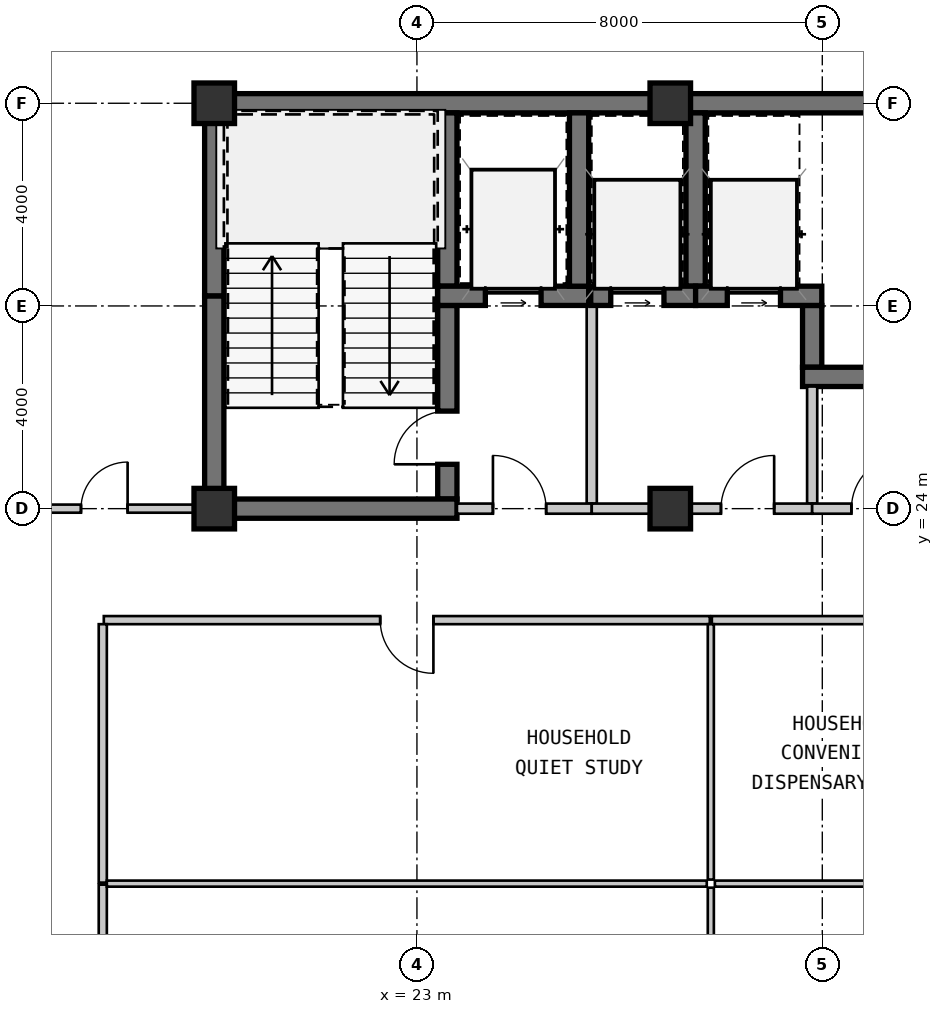
"""IFC4 building model, lengths in metres.
Left out: names, types, materials, properties, quantities, classifications, styles, units other than length and angle.
Written with IfcOpenShell. Run it as: python <this file> out.ifc"""

import sys

from ifc_helpers import new_model, si_unit, direction, frame, frame_2d, origin, origin_2d, place, context, subcontext, project, spatial, rectangle, extrude, source, transform, mapped, element, fill, save


model = new_model("IFC4")
c1 = context("Model", 3, precision=1e-05, world=origin(), true_north=direction((0.0, 1.0)))
c2 = subcontext(c1, "Body", "Model", "MODEL_VIEW")
j1 = project(units=[si_unit("LENGTHUNIT", "METRE"), si_unit("PLANEANGLEUNIT", "RADIAN")], contexts=[c1])
p1 = place(None, origin())
s1 = spatial("IfcSite", under=j1, at=p1, CompositionType="ELEMENT")
p2 = place(p1, origin())
s2 = spatial("IfcBuilding", under=s1, at=p2, CompositionType="ELEMENT")
p3 = place(p2, frame((0.0, 0.0, 45.15)))
s3 = spatial("IfcBuildingStorey", under=s2, at=p3, CompositionType="ELEMENT", Elevation=45.15)
m1 = source(origin(), c2, "Body", "SweptSolid", [
    extrude(rectangle(XDim=0.8, YDim=0.8, at=origin_2d()), origin(), (0.0, 0.0, 1.0), 3.15),
])
for number, where, z_axis, x_axis in (
    (1, (19.0, 24.0, 0.0), (0.0, 0.0, 1.0), (1.0, 0.0, 0.0)),
    (2, (28.0, 24.0, 0.0), (0.0, 0.0, 1.0), (1.0, 0.0, 0.0)),
    (3, (19.0, 32.0, 0.0), (0.0, 0.0, 1.0), (1.0, 0.0, 0.0)),
    (4, (28.0, 32.0, 0.0), (0.0, 0.0, 1.0), (1.0, 0.0, 0.0)),
):
    element("IfcColumn", number, at=place(p3, frame(where, z_axis=z_axis, x_axis=x_axis)), inside=s3, PredefinedType="COLUMN", context=c2, shape_type="MappedRepresentation", body=[
        mapped(m1, transform((0.0, 0.0, 0.0), scale=1.0)),
    ])
m2 = source(origin(), c2, "Body", "SweptSolid", [
    extrude(rectangle(XDim=9.19, YDim=0.38, at=frame_2d((4.595, 0.0))), origin(), (0.0, 0.0, 1.0), 2.93),
])
p4 = place(p3, frame((18.81, 32.0, 0.0), z_axis=(0.0, 0.0, 1.0), x_axis=(1.0, 0.0, 0.0)))
e5 = element("IfcWall", 5, at=p4, inside=s3, PredefinedType="SHEAR", context=c2, shape_type="MappedRepresentation", body=[
    mapped(m2, transform((0.0, 0.0, 0.0), scale=1.0)),
])
m3 = source(origin(), c2, "Body", "SweptSolid", [
    extrude(rectangle(XDim=11.2, YDim=0.38, at=frame_2d((5.6, 0.0))), origin(), (0.0, 0.0, 1.0), 2.93),
])
p5 = place(p3, frame((28.0, 32.0, 0.0), z_axis=(0.0, 0.0, 1.0), x_axis=(1.0, 0.0, 0.0)))
e6 = element("IfcWall", 6, at=p5, inside=s3, PredefinedType="SHEAR", context=c2, shape_type="MappedRepresentation", body=[
    mapped(m3, transform((0.0, 0.0, 0.0), scale=1.0)),
])
m4 = source(origin(), c2, "Body", "SweptSolid", [
    extrude(rectangle(XDim=4.01, YDim=0.38, at=frame_2d((2.005, 0.0))), origin(), (0.0, 0.0, 1.0), 2.93),
])
p6 = place(p3, frame((19.0, 24.19, 0.0), z_axis=(0.0, 0.0, 1.0), x_axis=(0.0, 1.0, 0.0)))
e7 = element("IfcWall", 7, at=p6, inside=s3, PredefinedType="SHEAR", context=c2, shape_type="MappedRepresentation", body=[
    mapped(m4, transform((0.0, 0.0, 0.0), scale=1.0)),
])
m5 = source(origin(), c2, "Body", "SweptSolid", [
    extrude(rectangle(XDim=3.61, YDim=0.38, at=frame_2d((1.805, 0.0))), origin(), (0.0, 0.0, 1.0), 2.93),
])
p7 = place(p3, frame((19.0, 28.2, 0.0), z_axis=(0.0, 0.0, 1.0), x_axis=(0.0, 1.0, 0.0)))
e8 = element("IfcWall", 8, at=p7, inside=s3, PredefinedType="SHEAR", context=c2, shape_type="MappedRepresentation", body=[
    mapped(m5, transform((0.0, 0.0, 0.0), scale=1.0)),
])
m6 = source(origin(), c2, "Body", "SweptSolid", [
    extrude(rectangle(XDim=3.42, YDim=0.38, at=frame_2d((1.71, 0.0))), origin(), (0.0, 0.0, 1.0), 2.93),
])
p8 = place(p3, frame((23.6, 28.39, 0.0), z_axis=(0.0, 0.0, 1.0), x_axis=(0.0, 1.0, 0.0)))
e9 = element("IfcWall", 9, at=p8, inside=s3, PredefinedType="SHEAR", context=c2, shape_type="MappedRepresentation", body=[
    mapped(m6, transform((0.0, 0.0, 0.0), scale=1.0)),
])
m7 = source(origin(), c2, "Body", "SweptSolid", [
    extrude(rectangle(XDim=3.82, YDim=0.38, at=frame_2d((1.91, 0.0))), origin(), (0.0, 0.0, 1.0), 2.93),
])
p9 = place(p3, frame((23.6, 24.19, 0.0), z_axis=(0.0, 0.0, 1.0), x_axis=(0.0, 1.0, 0.0)))
e10 = element("IfcWall", 10, at=p9, inside=s3, PredefinedType="SHEAR", context=c2, shape_type="MappedRepresentation", body=[
    mapped(m7, transform((0.0, 0.0, 0.0), scale=1.0)),
])
m8 = source(origin(), c2, "Body", "SweptSolid", [
    extrude(rectangle(XDim=1.05, YDim=2.1, at=frame_2d((0.525, 1.05))), frame((0.0, 0.2, 0.0), z_axis=(0.0, -1.0, 0.0), x_axis=(1.0, 0.0, 0.0)), (0.0, 0.0, 1.0), 0.4),
])
p10 = place(p9, frame((0.685, 0.0, 0.0)))
e11 = element("IfcOpeningElement", 11, at=p10, cuts=e10, PredefinedType="OPENING", context=c2, shape_type="MappedRepresentation", body=[
    mapped(m8, transform((0.0, 0.0, 0.0), scale=1.0)),
])
m9 = source(origin(), c2, "Body", "SweptSolid", [
    extrude(rectangle(XDim=4.98, YDim=0.38, at=frame_2d((2.49, 0.0))), origin(), (0.0, 0.0, 1.0), 2.93),
])
p11 = place(p3, frame((18.81, 24.0, 0.0), z_axis=(0.0, 0.0, 1.0), x_axis=(1.0, 0.0, 0.0)))
e12 = element("IfcWall", 12, at=p11, inside=s3, PredefinedType="SHEAR", context=c2, shape_type="MappedRepresentation", body=[
    mapped(m9, transform((0.0, 0.0, 0.0), scale=1.0)),
])
m10 = source(origin(), c2, "Body", "SweptSolid", [
    extrude(rectangle(XDim=2.98, YDim=0.38, at=frame_2d((1.49, 0.0))), origin(), (0.0, 0.0, 1.0), 2.93),
])
p12 = place(p3, frame((23.41, 28.2, 0.0), z_axis=(0.0, 0.0, 1.0), x_axis=(1.0, 0.0, 0.0)))
e13 = element("IfcWall", 13, at=p12, inside=s3, PredefinedType="SHEAR", context=c2, shape_type="MappedRepresentation", body=[
    mapped(m10, transform((0.0, 0.0, 0.0), scale=1.0)),
])
m11 = source(origin(), c2, "Body", "SweptSolid", [
    extrude(rectangle(XDim=1.1, YDim=2.15, at=frame_2d((0.55, 1.075))), frame((0.0, 0.2, 0.0), z_axis=(0.0, -1.0, 0.0), x_axis=(1.0, 0.0, 0.0)), (0.0, 0.0, 1.0), 0.4),
])
p13 = place(p12, frame((0.94, 0.0, 0.0)))
e14 = element("IfcOpeningElement", 14, at=p13, cuts=e13, PredefinedType="OPENING", context=c2, shape_type="MappedRepresentation", body=[
    mapped(m11, transform((0.0, 0.0, 0.0), scale=1.0)),
])
p14 = place(p3, frame((26.2, 28.39, 0.0), z_axis=(0.0, 0.0, 1.0), x_axis=(0.0, 1.0, 0.0)))
e15 = element("IfcWall", 15, at=p14, inside=s3, PredefinedType="SHEAR", context=c2, shape_type="MappedRepresentation", body=[
    mapped(m6, transform((0.0, 0.0, 0.0), scale=1.0)),
])
m12 = source(origin(), c2, "Body", "SweptSolid", [
    extrude(rectangle(XDim=3.91, YDim=0.2, at=frame_2d((1.955, 0.0))), origin(), (0.0, 0.0, 1.0), 2.93),
])
p15 = place(p3, frame((26.45, 24.1, 0.0), z_axis=(0.0, 0.0, 1.0), x_axis=(0.0, 1.0, 0.0)))
e16 = element("IfcWall", 16, at=p15, inside=s3, PredefinedType="SOLIDWALL", context=c2, shape_type="MappedRepresentation", body=[
    mapped(m12, transform((0.0, 0.0, 0.0), scale=1.0)),
])
m13 = source(origin(), c2, "Body", "SweptSolid", [
    extrude(rectangle(XDim=2.66, YDim=0.2, at=frame_2d((1.33, 0.0))), origin(), (0.0, 0.0, 1.0), 2.47),
])
p16 = place(p3, frame((23.79, 24.0, 0.0), z_axis=(0.0, 0.0, 1.0), x_axis=(1.0, 0.0, 0.0)))
e17 = element("IfcWall", 17, at=p16, inside=s3, PredefinedType="SOLIDWALL", context=c2, shape_type="MappedRepresentation", body=[
    mapped(m13, transform((0.0, 0.0, 0.0), scale=1.0)),
])
m14 = source(origin(), c2, "Body", "SweptSolid", [
    extrude(rectangle(XDim=1.05, YDim=2.1, at=frame_2d((0.525, 1.05))), frame((0.0, 0.11, 0.0), z_axis=(0.0, -1.0, 0.0), x_axis=(1.0, 0.0, 0.0)), (0.0, 0.0, 1.0), 0.22),
])
p17 = place(p16, frame((0.71, 0.0, 0.0)))
e18 = element("IfcOpeningElement", 18, at=p17, cuts=e17, PredefinedType="OPENING", context=c2, shape_type="MappedRepresentation", body=[
    mapped(m14, transform((0.0, 0.0, 0.0), scale=1.0)),
])
m15 = source(origin(), c2, "Body", "SweptSolid", [
    extrude(rectangle(XDim=1.22, YDim=0.38, at=frame_2d((0.61, 0.0))), origin(), (0.0, 0.0, 1.0), 2.93),
])
p18 = place(p3, frame((30.8, 28.01, 0.0), z_axis=(0.0, 0.0, 1.0), x_axis=(0.0, -1.0, 0.0)))
e19 = element("IfcWall", 19, at=p18, inside=s3, PredefinedType="SHEAR", context=c2, shape_type="MappedRepresentation", body=[
    mapped(m15, transform((0.0, 0.0, 0.0), scale=1.0)),
])
m16 = source(origin(), c2, "Body", "SweptSolid", [
    extrude(rectangle(XDim=2.24, YDim=0.38, at=frame_2d((1.12, 0.0))), origin(), (0.0, 0.0, 1.0), 2.93),
])
p19 = place(p3, frame((30.61, 26.6, 0.0), z_axis=(0.0, 0.0, 1.0), x_axis=(1.0, 0.0, 0.0)))
e20 = element("IfcWall", 20, at=p19, inside=s3, PredefinedType="SHEAR", context=c2, shape_type="MappedRepresentation", body=[
    mapped(m16, transform((0.0, 0.0, 0.0), scale=1.0)),
])
p20 = place(p3, frame((28.5, 28.39, 0.0), z_axis=(0.0, 0.0, 1.0), x_axis=(0.0, 1.0, 0.0)))
e21 = element("IfcWall", 21, at=p20, inside=s3, PredefinedType="SHEAR", context=c2, shape_type="MappedRepresentation", body=[
    mapped(m6, transform((0.0, 0.0, 0.0), scale=1.0)),
])
m17 = source(origin(), c2, "Body", "SweptSolid", [
    extrude(rectangle(XDim=2.07, YDim=0.38, at=frame_2d((1.035, 0.0))), origin(), (0.0, 0.0, 1.0), 2.93),
])
p21 = place(p3, frame((26.43, 28.2, 0.0), z_axis=(0.0, 0.0, 1.0), x_axis=(1.0, 0.0, 0.0)))
e22 = element("IfcWall", 22, at=p21, inside=s3, PredefinedType="SHEAR", context=c2, shape_type="MappedRepresentation", body=[
    mapped(m17, transform((0.0, 0.0, 0.0), scale=1.0)),
])
m18 = source(origin(), c2, "Body", "SweptSolid", [
    extrude(rectangle(XDim=1.05, YDim=2.15, at=frame_2d((0.525, 1.075))), frame((0.0, 0.2, 0.0), z_axis=(0.0, -1.0, 0.0), x_axis=(1.0, 0.0, 0.0)), (0.0, 0.0, 1.0), 0.4),
])
p22 = place(p21, frame((0.395, 0.0, 0.0)))
e23 = element("IfcOpeningElement", 23, at=p22, cuts=e22, PredefinedType="OPENING", context=c2, shape_type="MappedRepresentation", body=[
    mapped(m18, transform((0.0, 0.0, 0.0), scale=1.0)),
])
m19 = source(origin(), c2, "Body", "SweptSolid", [
    extrude(rectangle(XDim=2.49, YDim=0.38, at=frame_2d((1.245, 0.0))), origin(), (0.0, 0.0, 1.0), 2.93),
])
p23 = place(p3, frame((28.5, 28.2, 0.0), z_axis=(0.0, 0.0, 1.0), x_axis=(1.0, 0.0, 0.0)))
e24 = element("IfcWall", 24, at=p23, inside=s3, PredefinedType="SHEAR", context=c2, shape_type="MappedRepresentation", body=[
    mapped(m19, transform((0.0, 0.0, 0.0), scale=1.0)),
])
p24 = place(p23, frame((0.625, 0.0, 0.0)))
e25 = element("IfcOpeningElement", 25, at=p24, cuts=e24, PredefinedType="OPENING", context=c2, shape_type="MappedRepresentation", body=[
    mapped(m18, transform((0.0, 0.0, 0.0), scale=1.0)),
])
m20 = source(origin(), c2, "Body", "SweptSolid", [
    extrude(rectangle(XDim=2.31, YDim=0.2, at=frame_2d((1.155, 0.0))), origin(), (0.0, 0.0, 1.0), 2.93),
])
p25 = place(p3, frame((30.8, 26.41, 0.0), z_axis=(0.0, 0.0, 1.0), x_axis=(0.0, -1.0, 0.0)))
e26 = element("IfcWall", 26, at=p25, inside=s3, PredefinedType="SOLIDWALL", context=c2, shape_type="MappedRepresentation", body=[
    mapped(m20, transform((0.0, 0.0, 0.0), scale=1.0)),
])
m21 = source(origin(), c2, "Body", "SweptSolid", [
    extrude(rectangle(XDim=4.35, YDim=0.2, at=frame_2d((2.175, 0.0))), origin(), (0.0, 0.0, 1.0), 2.47),
])
p26 = place(p3, frame((30.8, 24.0, 0.0), z_axis=(0.0, 0.0, 1.0), x_axis=(-1.0, 0.0, 0.0)))
e27 = element("IfcWall", 27, at=p26, inside=s3, PredefinedType="SOLIDWALL", context=c2, shape_type="MappedRepresentation", body=[
    mapped(m21, transform((0.0, 0.0, 0.0), scale=1.0)),
])
p27 = place(p26, frame((0.75, 0.0, 0.0)))
e28 = element("IfcOpeningElement", 28, at=p27, cuts=e27, PredefinedType="OPENING", context=c2, shape_type="MappedRepresentation", body=[
    mapped(m14, transform((0.0, 0.0, 0.0), scale=1.0)),
])
m22 = source(origin(), c2, "Body", "SweptSolid", [
    extrude(rectangle(XDim=2.6, YDim=0.2, at=frame_2d((1.3, 0.0))), origin(), (0.0, 0.0, 1.0), 2.47),
])
p28 = place(p3, frame((33.4, 24.0, 0.0), z_axis=(0.0, 0.0, 1.0), x_axis=(-1.0, 0.0, 0.0)))
e29 = element("IfcWall", 29, at=p28, inside=s3, PredefinedType="SOLIDWALL", context=c2, shape_type="MappedRepresentation", body=[
    mapped(m22, transform((0.0, 0.0, 0.0), scale=1.0)),
])
p29 = place(p28, frame((0.775, 0.0, 0.0)))
e30 = element("IfcOpeningElement", 30, at=p29, cuts=e29, PredefinedType="OPENING", context=c2, shape_type="MappedRepresentation", body=[
    mapped(m14, transform((0.0, 0.0, 0.0), scale=1.0)),
])
m23 = source(origin(), c2, "Body", "SweptSolid", [
    extrude(rectangle(XDim=5.16, YDim=0.16, at=frame_2d((2.58, 0.0))), origin(), (0.0, 0.0, 1.0), 2.93),
])
p30 = place(p3, frame((16.8, 16.58, 0.0), z_axis=(0.0, 0.0, 1.0), x_axis=(0.0, -1.0, 0.0)))
e31 = element("IfcWall", 31, at=p30, inside=s3, PredefinedType="PARTITIONING", context=c2, shape_type="MappedRepresentation", body=[
    mapped(m23, transform((0.0, 0.0, 0.0), scale=1.0)),
])
m24 = source(origin(), c2, "Body", "SweptSolid", [
    extrude(rectangle(XDim=11.959, YDim=0.16, at=frame_2d((5.98, 0.0))), origin(), (0.0, 0.0, 1.0), 2.93),
])
p31 = place(p3, frame((28.78, 21.8, 0.0), z_axis=(0.0, 0.0, 1.0), x_axis=(-1.0, 0.0, 0.0)))
e32 = element("IfcWall", 32, at=p31, inside=s3, PredefinedType="PARTITIONING", context=c2, shape_type="MappedRepresentation", body=[
    mapped(m24, transform((0.0, 0.0, 0.0), scale=1.0)),
])
m25 = source(origin(), c2, "Body", "SweptSolid", [
    extrude(rectangle(XDim=1.05, YDim=2.1, at=frame_2d((0.525, 1.05))), frame((0.0, 0.09, 0.0), z_axis=(0.0, -1.0, 0.0), x_axis=(1.0, 0.0, 0.0)), (0.0, 0.0, 1.0), 0.18),
])
p32 = place(p31, frame((5.455, 0.0, 0.0)))
e33 = element("IfcOpeningElement", 33, at=p32, cuts=e32, PredefinedType="OPENING", context=c2, shape_type="MappedRepresentation", body=[
    mapped(m25, transform((0.0, 0.0, 0.0), scale=1.0)),
])
m26 = source(origin(), c2, "Body", "SweptSolid", [
    extrude(rectangle(XDim=5.1, YDim=0.16, at=frame_2d((2.55, 0.0))), origin(), (0.0, 0.0, 1.0), 2.93),
])
p33 = place(p3, frame((16.8, 21.72, 0.0), z_axis=(0.0, 0.0, 1.0), x_axis=(0.0, -1.0, 0.0)))
e34 = element("IfcWall", 34, at=p33, inside=s3, PredefinedType="PARTITIONING", context=c2, shape_type="MappedRepresentation", body=[
    mapped(m26, transform((0.0, 0.0, 0.0), scale=1.0)),
])
m27 = source(origin(), c2, "Body", "SweptSolid", [
    extrude(rectangle(XDim=12.159, YDim=0.16, at=frame_2d((6.08, 0.0))), origin(), (0.0, 0.0, 1.0), 2.93),
])
p34 = place(p3, frame((40.98, 21.8, 0.0), z_axis=(0.0, 0.0, 1.0), x_axis=(-1.0, 0.0, 0.0)))
e35 = element("IfcWall", 35, at=p34, inside=s3, PredefinedType="PARTITIONING", context=c2, shape_type="MappedRepresentation", body=[
    mapped(m27, transform((0.0, 0.0, 0.0), scale=1.0)),
])
p35 = place(p34, frame((5.555, 0.0, 0.0)))
e36 = element("IfcOpeningElement", 36, at=p35, cuts=e35, PredefinedType="OPENING", context=c2, shape_type="MappedRepresentation", body=[
    mapped(m25, transform((0.0, 0.0, 0.0), scale=1.0)),
])
m28 = source(origin(), c2, "Body", "SweptSolid", [
    extrude(rectangle(XDim=4.13, YDim=0.16, at=frame_2d((2.065, 0.0))), origin(), (0.0, 0.0, 1.0), 2.93),
])
p36 = place(p3, frame((14.68, 24.0, 0.0), z_axis=(0.0, 0.0, 1.0), x_axis=(1.0, 0.0, 0.0)))
e37 = element("IfcWall", 37, at=p36, inside=s3, PredefinedType="PARTITIONING", context=c2, shape_type="MappedRepresentation", body=[
    mapped(m28, transform((0.0, 0.0, 0.0), scale=1.0)),
])
m29 = source(origin(), c2, "Body", "SweptSolid", [
    extrude(rectangle(XDim=0.92, YDim=2.1, at=frame_2d((0.46, 1.05))), frame((0.0, 0.09, 0.0), z_axis=(0.0, -1.0, 0.0), x_axis=(1.0, 0.0, 0.0)), (0.0, 0.0, 1.0), 0.18),
])
p37 = place(p36, frame((1.69, 0.0, 0.0)))
e38 = element("IfcOpeningElement", 38, at=p37, cuts=e37, PredefinedType="OPENING", context=c2, shape_type="MappedRepresentation", body=[
    mapped(m29, transform((0.0, 0.0, 0.0), scale=1.0)),
])
m30 = source(origin(), c2, "Body", "SweptSolid", [
    extrude(rectangle(XDim=11.84, YDim=0.12, at=frame_2d((5.92, 0.0))), origin(), (0.0, 0.0, 1.0), 2.93),
])
p38 = place(p3, frame((16.88, 16.6, 0.0), z_axis=(0.0, 0.0, 1.0), x_axis=(1.0, 0.0, 0.0)))
e39 = element("IfcWall", 39, at=p38, inside=s3, PredefinedType="PARTITIONING", context=c2, shape_type="MappedRepresentation", body=[
    mapped(m30, transform((0.0, 0.0, 0.0), scale=1.0)),
])
m31 = source(origin(), c2, "Body", "SweptSolid", [
    extrude(rectangle(XDim=5.04, YDim=0.12, at=frame_2d((2.52, 0.0))), origin(), (0.0, 0.0, 1.0), 2.93),
])
for number, where, z_axis, x_axis in (
    (40, (28.8, 16.52, 0.0), (0.0, 0.0, 1.0), (0.0, -1.0, 0.0)),
    (41, (28.8, 21.72, 0.0), (0.0, 0.0, 1.0), (0.0, -1.0, 0.0)),
):
    element("IfcWall", number, at=place(p3, frame(where, z_axis=z_axis, x_axis=x_axis)), inside=s3, PredefinedType="PARTITIONING", context=c2, shape_type="MappedRepresentation", body=[
        mapped(m31, transform((0.0, 0.0, 0.0), scale=1.0)),
    ])
m32 = source(origin(), c2, "Body", "SweptSolid", [
    extrude(rectangle(XDim=12.04, YDim=0.12, at=frame_2d((6.02, 0.0))), origin(), (0.0, 0.0, 1.0), 2.93),
])
p39 = place(p3, frame((28.88, 16.6, 0.0), z_axis=(0.0, 0.0, 1.0), x_axis=(1.0, 0.0, 0.0)))
e42 = element("IfcWall", 42, at=p39, inside=s3, PredefinedType="PARTITIONING", context=c2, shape_type="MappedRepresentation", body=[
    mapped(m32, transform((0.0, 0.0, 0.0), scale=1.0)),
])
m33 = source(origin(), c2, "Body", "SweptSolid", [
    extrude(rectangle(XDim=1.05, YDim=2.1, at=frame_2d((0.525, 1.05))), frame((0.0, 0.025, 0.0), z_axis=(0.0, -1.0, 0.0), x_axis=(1.0, 0.0, 0.0)), (0.0, 0.0, 1.0), 0.05),
])
p40 = place(p10, origin())
e43 = element("IfcDoor", 43, at=p40, inside=s3, OperationType="SINGLE_SWING_LEFT", PredefinedType="DOOR", context=c2, shape_type="MappedRepresentation", body=[
    mapped(m33, transform((0.0, 0.0, 0.0), scale=1.0)),
])
fill(e11, e43)
m34 = source(origin(), c2, "Body", "SweptSolid", [
    extrude(rectangle(XDim=1.1, YDim=2.15, at=frame_2d((0.55, 1.075))), frame((0.0, 0.025, 0.0), z_axis=(0.0, -1.0, 0.0), x_axis=(1.0, 0.0, 0.0)), (0.0, 0.0, 1.0), 0.05),
])
p41 = place(p13, origin())
e44 = element("IfcDoor", 44, at=p41, inside=s3, OperationType="SLIDING_TO_LEFT", PredefinedType="DOOR", context=c2, shape_type="MappedRepresentation", body=[
    mapped(m34, transform((0.0, 0.0, 0.0), scale=1.0)),
])
fill(e14, e44)
p42 = place(p17, origin())
e45 = element("IfcDoor", 45, at=p42, inside=s3, OperationType="SINGLE_SWING_LEFT", PredefinedType="DOOR", context=c2, shape_type="MappedRepresentation", body=[
    mapped(m33, transform((0.0, 0.0, 0.0), scale=1.0)),
])
fill(e18, e45)
m35 = source(origin(), c2, "Body", "SweptSolid", [
    extrude(rectangle(XDim=1.05, YDim=2.15, at=frame_2d((0.525, 1.075))), frame((0.0, 0.025, 0.0), z_axis=(0.0, -1.0, 0.0), x_axis=(1.0, 0.0, 0.0)), (0.0, 0.0, 1.0), 0.05),
])
p43 = place(p22, origin())
e46 = element("IfcDoor", 46, at=p43, inside=s3, OperationType="SLIDING_TO_LEFT", PredefinedType="DOOR", context=c2, shape_type="MappedRepresentation", body=[
    mapped(m35, transform((0.0, 0.0, 0.0), scale=1.0)),
])
fill(e23, e46)
p44 = place(p24, origin())
e47 = element("IfcDoor", 47, at=p44, inside=s3, OperationType="SLIDING_TO_LEFT", PredefinedType="DOOR", context=c2, shape_type="MappedRepresentation", body=[
    mapped(m35, transform((0.0, 0.0, 0.0), scale=1.0)),
])
fill(e25, e47)
p45 = place(p27, frame((1.05, 0.0, 0.0), z_axis=(0.0, 0.0, 1.0), x_axis=(-1.0, 0.0, 0.0)))
e48 = element("IfcDoor", 48, at=p45, inside=s3, OperationType="SINGLE_SWING_RIGHT", PredefinedType="DOOR", context=c2, shape_type="MappedRepresentation", body=[
    mapped(m33, transform((0.0, 0.0, 0.0), scale=1.0)),
])
fill(e28, e48)
p46 = place(p29, frame((1.05, 0.0, 0.0), z_axis=(0.0, 0.0, 1.0), x_axis=(-1.0, 0.0, 0.0)))
e49 = element("IfcDoor", 49, at=p46, inside=s3, OperationType="SINGLE_SWING_RIGHT", PredefinedType="DOOR", context=c2, shape_type="MappedRepresentation", body=[
    mapped(m33, transform((0.0, 0.0, 0.0), scale=1.0)),
])
fill(e30, e49)
p47 = place(p32, origin())
e50 = element("IfcDoor", 50, at=p47, inside=s3, OperationType="SINGLE_SWING_LEFT", PredefinedType="DOOR", context=c2, shape_type="MappedRepresentation", body=[
    mapped(m33, transform((0.0, 0.0, 0.0), scale=1.0)),
])
fill(e33, e50)
m36 = source(origin(), c2, "Body", "SweptSolid", [
    extrude(rectangle(XDim=0.92, YDim=2.1, at=frame_2d((0.46, 1.05))), frame((0.0, 0.025, 0.0), z_axis=(0.0, -1.0, 0.0), x_axis=(1.0, 0.0, 0.0)), (0.0, 0.0, 1.0), 0.05),
])
p48 = place(p37, origin())
e51 = element("IfcDoor", 51, at=p48, inside=s3, OperationType="SINGLE_SWING_RIGHT", PredefinedType="DOOR", context=c2, shape_type="MappedRepresentation", body=[
    mapped(m36, transform((0.0, 0.0, 0.0), scale=1.0)),
])
fill(e38, e51)
save(model, sys.argv[1])
